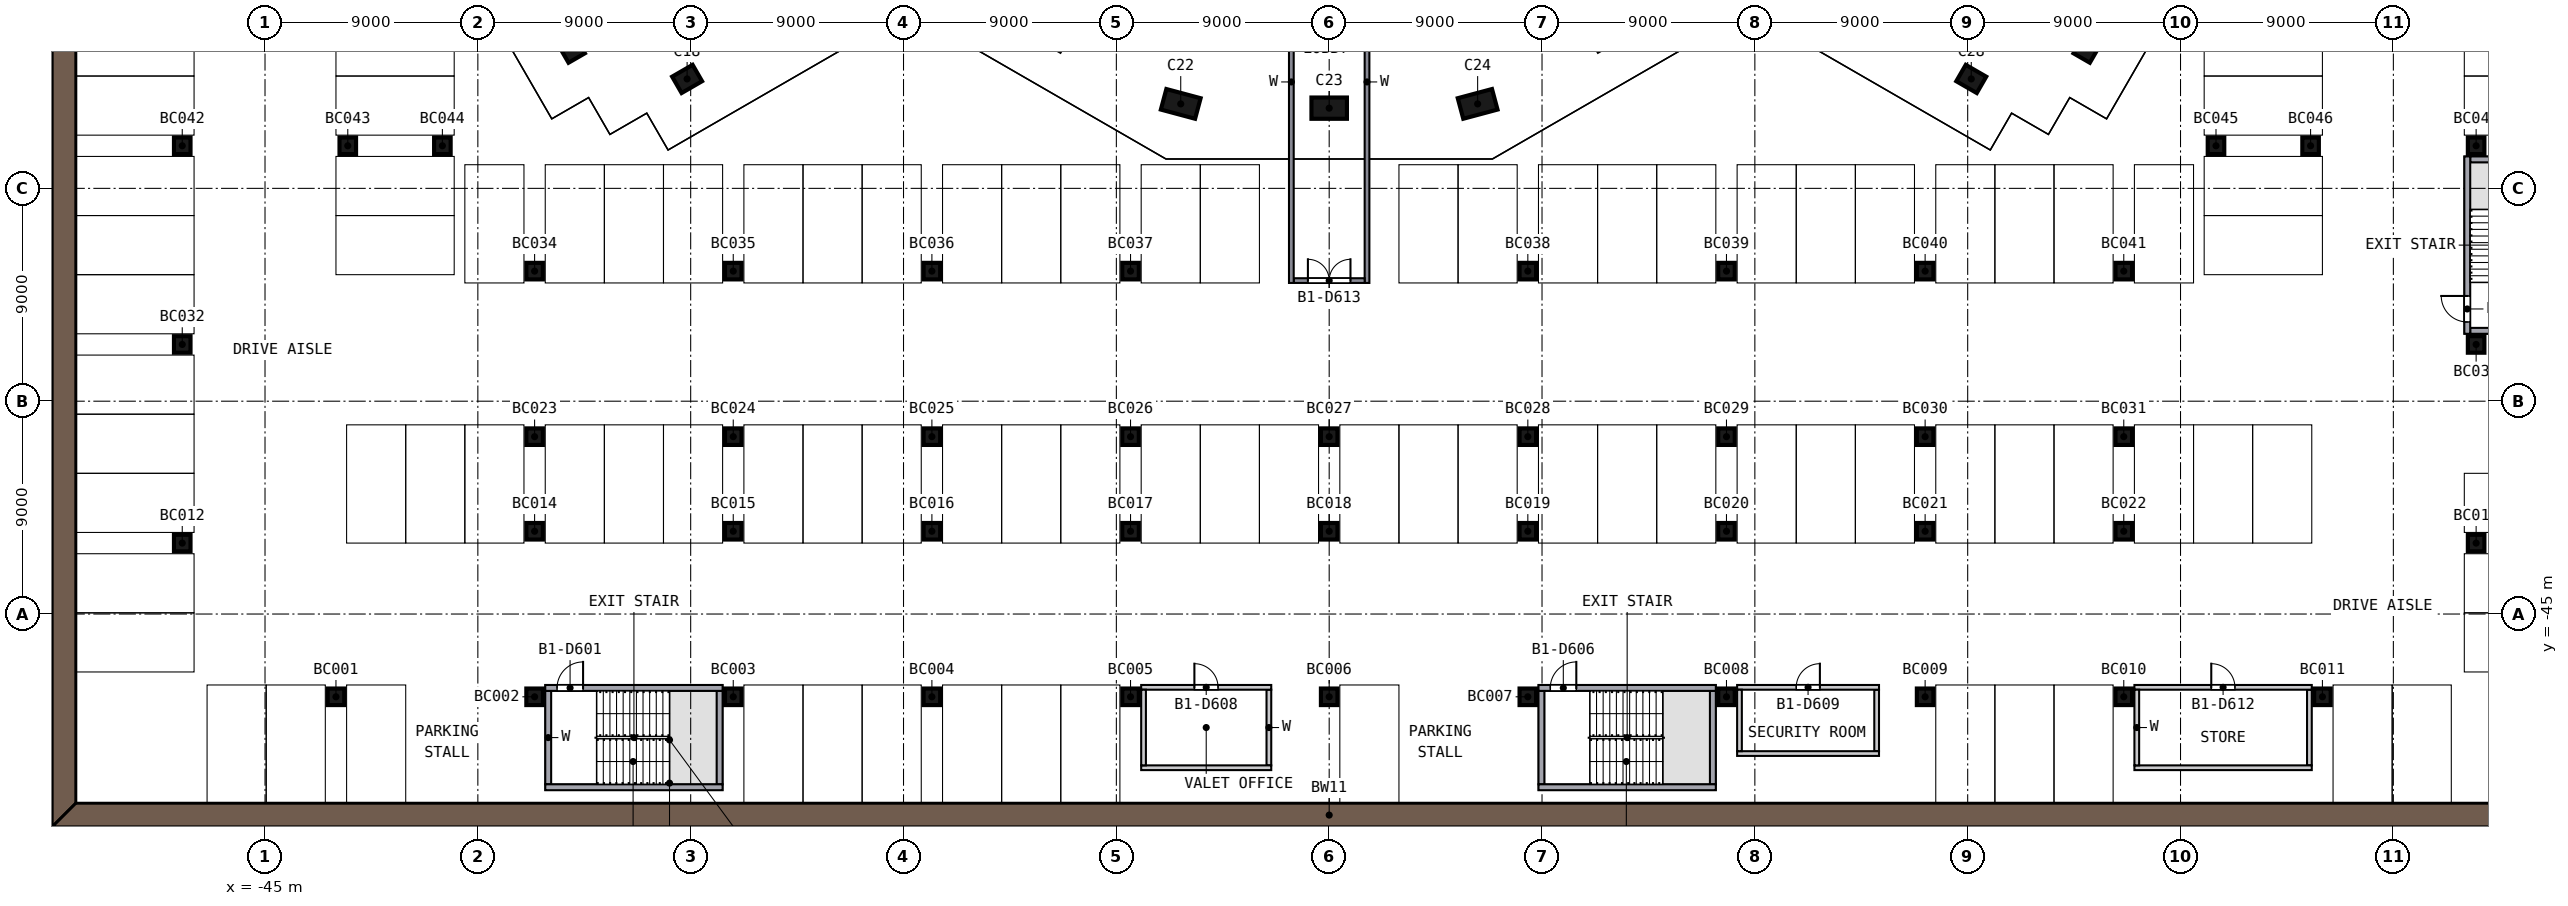
"""IFC4 building model, lengths in metres.
Left out: names, types, materials, properties, quantities, classifications, styles, units other than length and angle.
Written with IfcOpenShell. Run it as: python <this file> out.ifc"""

import sys

from ifc_helpers import new_model, si_unit, direction, frame, frame_2d, origin, origin_2d, place, context, subcontext, project, spatial, polyline, rectangle, outline, extrude, element, fill, save


model = new_model("IFC4")
c1 = context("Model", 3, precision=1e-05, world=origin(), true_north=direction((0.0, 1.0)))
c2 = subcontext(c1, "Body", "Model", "MODEL_VIEW")
j1 = project(units=[si_unit("LENGTHUNIT", "METRE"), si_unit("PLANEANGLEUNIT", "RADIAN")], contexts=[c1])
p1 = place(None, origin())
s1 = spatial("IfcSite", under=j1, at=p1, CompositionType="ELEMENT")
p2 = place(p1, origin())
s2 = spatial("IfcBuilding", under=s1, at=p2, CompositionType="ELEMENT")
p3 = place(p2, frame((0.0, 0.0, -3.9)))
s3 = spatial("IfcBuildingStorey", under=s2, at=p3, CompositionType="ELEMENT", Elevation=-3.9)
for number, where, z_axis, x_axis in (
    (1, (-32.069, -21.055, 0.0), (0.0, 0.0, 1.0), (0.5, -0.866, 0.0)),
    (2, (-27.151, -22.373, 0.0), (0.0, 0.0, 1.0), (0.866, 0.5, 0.0)),
):
    element("IfcColumn", number, at=place(p3, frame(where, z_axis=z_axis, x_axis=x_axis)), inside=s3, PredefinedType="COLUMN", context=c2, shape_type="SweptSolid", body=[
        extrude(rectangle(XDim=1.0, YDim=0.8, at=origin_2d()), origin(), (0.0, 0.0, 1.0), 3.45),
    ])
for number, where, z_axis, x_axis in (
    (3, (-6.278, -23.428, 0.0), (0.0, 0.0, 1.0), (-0.966, 0.259, 0.0)),
    (4, (0.0, -23.608, 0.0), (0.0, 0.0, 1.0), (1.0, 0.0, 0.0)),
    (5, (6.278, -23.428, 0.0), (0.0, 0.0, 1.0), (-0.966, -0.259, 0.0)),
):
    element("IfcColumn", number, at=place(p3, frame(where, z_axis=z_axis, x_axis=x_axis)), inside=s3, PredefinedType="COLUMN", context=c2, shape_type="SweptSolid", body=[
        extrude(rectangle(XDim=1.5, YDim=0.9, at=origin_2d()), origin(), (0.0, 0.0, 1.0), 3.45),
    ])
for number, where, z_axis, x_axis in (
    (6, (27.151, -22.373, 0.0), (0.0, 0.0, 1.0), (0.866, -0.5, 0.0)),
    (7, (32.069, -21.055, 0.0), (0.0, 0.0, 1.0), (0.5, 0.866, 0.0)),
):
    element("IfcColumn", number, at=place(p3, frame(where, z_axis=z_axis, x_axis=x_axis)), inside=s3, PredefinedType="COLUMN", context=c2, shape_type="SweptSolid", body=[
        extrude(rectangle(XDim=1.0, YDim=0.8, at=origin_2d()), origin(), (0.0, 0.0, 1.0), 3.45),
    ])
p4 = place(p3, origin())
e8 = element("IfcWall", 8, at=p4, inside=s3, PredefinedType="SOLIDWALL", context=c2, shape_type="SweptSolid", body=[
    extrude(outline(polyline([(-54.0, 54.0), (-54.0, -54.0), (-53.0, -53.0), (-53.0, 53.0), (-54.0, 54.0)])), origin(), (0.0, 0.0, 1.0), 3.9),
])
p5 = place(p3, origin())
e9 = element("IfcWall", 9, at=p5, inside=s3, PredefinedType="SOLIDWALL", context=c2, shape_type="SweptSolid", body=[
    extrude(outline(polyline([(-54.0, -54.0), (54.0, -54.0), (53.0, -53.0), (-53.0, -53.0), (-54.0, -54.0)])), origin(), (0.0, 0.0, 1.0), 3.9),
])
for number, where, z_axis, x_axis in (
    (10, (-42.0, -48.5, 0.0), (0.0, 0.0, 1.0), (1.0, 0.0, 0.0)),
    (11, (-33.6, -48.5, 0.0), (0.0, 0.0, 1.0), (1.0, 0.0, 0.0)),
    (12, (-25.2, -48.5, 0.0), (0.0, 0.0, 1.0), (1.0, 0.0, 0.0)),
    (13, (-16.8, -48.5, 0.0), (0.0, 0.0, 1.0), (1.0, 0.0, 0.0)),
    (14, (-8.4, -48.5, 0.0), (0.0, 0.0, 1.0), (1.0, 0.0, 0.0)),
    (15, (0.0, -48.5, 0.0), (0.0, 0.0, 1.0), (1.0, 0.0, 0.0)),
    (16, (8.4, -48.5, 0.0), (0.0, 0.0, 1.0), (1.0, 0.0, 0.0)),
    (17, (16.8, -48.5, 0.0), (0.0, 0.0, 1.0), (1.0, 0.0, 0.0)),
    (18, (25.2, -48.5, 0.0), (0.0, 0.0, 1.0), (1.0, 0.0, 0.0)),
    (19, (33.6, -48.5, 0.0), (0.0, 0.0, 1.0), (1.0, 0.0, 0.0)),
    (20, (42.0, -48.5, 0.0), (0.0, 0.0, 1.0), (1.0, 0.0, 0.0)),
    (21, (-48.5, -42.0, 0.0), (0.0, 0.0, 1.0), (1.0, 0.0, 0.0)),
    (22, (48.5, -42.0, 0.0), (0.0, 0.0, 1.0), (1.0, 0.0, 0.0)),
    (23, (-33.6, -41.5, 0.0), (0.0, 0.0, 1.0), (1.0, 0.0, 0.0)),
    (24, (-25.2, -41.5, 0.0), (0.0, 0.0, 1.0), (1.0, 0.0, 0.0)),
    (25, (-16.8, -41.5, 0.0), (0.0, 0.0, 1.0), (1.0, 0.0, 0.0)),
    (26, (-8.4, -41.5, 0.0), (0.0, 0.0, 1.0), (1.0, 0.0, 0.0)),
    (27, (0.0, -41.5, 0.0), (0.0, 0.0, 1.0), (1.0, 0.0, 0.0)),
    (28, (8.4, -41.5, 0.0), (0.0, 0.0, 1.0), (1.0, 0.0, 0.0)),
    (29, (16.8, -41.5, 0.0), (0.0, 0.0, 1.0), (1.0, 0.0, 0.0)),
    (30, (25.2, -41.5, 0.0), (0.0, 0.0, 1.0), (1.0, 0.0, 0.0)),
    (31, (33.6, -41.5, 0.0), (0.0, 0.0, 1.0), (1.0, 0.0, 0.0)),
    (32, (-33.6, -37.5, 0.0), (0.0, 0.0, 1.0), (1.0, 0.0, 0.0)),
    (33, (-25.2, -37.5, 0.0), (0.0, 0.0, 1.0), (1.0, 0.0, 0.0)),
    (34, (-16.8, -37.5, 0.0), (0.0, 0.0, 1.0), (1.0, 0.0, 0.0)),
    (35, (-8.4, -37.5, 0.0), (0.0, 0.0, 1.0), (1.0, 0.0, 0.0)),
    (36, (0.0, -37.5, 0.0), (0.0, 0.0, 1.0), (1.0, 0.0, 0.0)),
    (37, (8.4, -37.5, 0.0), (0.0, 0.0, 1.0), (1.0, 0.0, 0.0)),
    (38, (16.8, -37.5, 0.0), (0.0, 0.0, 1.0), (1.0, 0.0, 0.0)),
    (39, (25.2, -37.5, 0.0), (0.0, 0.0, 1.0), (1.0, 0.0, 0.0)),
    (40, (33.6, -37.5, 0.0), (0.0, 0.0, 1.0), (1.0, 0.0, 0.0)),
    (41, (-48.5, -33.6, 0.0), (0.0, 0.0, 1.0), (1.0, 0.0, 0.0)),
    (42, (48.5, -33.6, 0.0), (0.0, 0.0, 1.0), (1.0, 0.0, 0.0)),
    (43, (-33.6, -30.5, 0.0), (0.0, 0.0, 1.0), (1.0, 0.0, 0.0)),
    (44, (-25.2, -30.5, 0.0), (0.0, 0.0, 1.0), (1.0, 0.0, 0.0)),
    (45, (-16.8, -30.5, 0.0), (0.0, 0.0, 1.0), (1.0, 0.0, 0.0)),
    (46, (-8.4, -30.5, 0.0), (0.0, 0.0, 1.0), (1.0, 0.0, 0.0)),
    (47, (8.4, -30.5, 0.0), (0.0, 0.0, 1.0), (1.0, 0.0, 0.0)),
    (48, (16.8, -30.5, 0.0), (0.0, 0.0, 1.0), (1.0, 0.0, 0.0)),
    (49, (25.2, -30.5, 0.0), (0.0, 0.0, 1.0), (1.0, 0.0, 0.0)),
    (50, (33.6, -30.5, 0.0), (0.0, 0.0, 1.0), (1.0, 0.0, 0.0)),
    (51, (-48.5, -25.2, 0.0), (0.0, 0.0, 1.0), (1.0, 0.0, 0.0)),
    (52, (-41.5, -25.2, 0.0), (0.0, 0.0, 1.0), (1.0, 0.0, 0.0)),
    (53, (-37.5, -25.2, 0.0), (0.0, 0.0, 1.0), (1.0, 0.0, 0.0)),
    (54, (37.5, -25.2, 0.0), (0.0, 0.0, 1.0), (1.0, 0.0, 0.0)),
    (55, (41.5, -25.2, 0.0), (0.0, 0.0, 1.0), (1.0, 0.0, 0.0)),
    (56, (48.5, -25.2, 0.0), (0.0, 0.0, 1.0), (1.0, 0.0, 0.0)),
):
    element("IfcColumn", number, at=place(p3, frame(where, z_axis=z_axis, x_axis=x_axis)), inside=s3, PredefinedType="COLUMN", context=c2, shape_type="SweptSolid", body=[
        extrude(rectangle(XDim=0.7, YDim=0.7, at=origin_2d()), origin(), (0.0, 0.0, 1.0), 3.84),
    ])
p6 = place(p3, frame((-33.15, -48.125, 0.0), z_axis=(0.0, 0.0, 1.0), x_axis=(1.0, 0.0, 0.0)))
e57 = element("IfcWall", 57, at=p6, inside=s3, PredefinedType="SOLIDWALL", context=c2, shape_type="SweptSolid", body=[
    extrude(rectangle(XDim=7.5, YDim=0.25, at=frame_2d((3.75, 0.0))), origin(), (0.0, 0.0, 1.0), 3.9),
])
p7 = place(p6, frame((0.5, 0.0, 0.0)))
e58 = element("IfcOpeningElement", 58, at=p7, cuts=e57, PredefinedType="OPENING", context=c2, shape_type="SweptSolid", body=[
    extrude(rectangle(XDim=1.1, YDim=2.1, at=frame_2d((0.55, 1.05))), frame((0.0, 0.135, 0.0), z_axis=(0.0, -1.0, 0.0), x_axis=(1.0, 0.0, 0.0)), (0.0, 0.0, 1.0), 0.27),
])
p8 = place(p3, frame((-33.15, -52.325, 0.0), z_axis=(0.0, 0.0, 1.0), x_axis=(1.0, 0.0, 0.0)))
e59 = element("IfcWall", 59, at=p8, inside=s3, PredefinedType="SOLIDWALL", context=c2, shape_type="SweptSolid", body=[
    extrude(rectangle(XDim=7.5, YDim=0.25, at=frame_2d((3.75, 0.0))), origin(), (0.0, 0.0, 1.0), 3.9),
])
for number, where, z_axis, x_axis in (
    (60, (-33.025, -52.2, 0.0), (0.0, 0.0, 1.0), (0.0, 1.0, 0.0)),
    (61, (-25.775, -52.2, 0.0), (0.0, 0.0, 1.0), (0.0, 1.0, 0.0)),
):
    element("IfcWall", number, at=place(p3, frame(where, z_axis=z_axis, x_axis=x_axis)), inside=s3, PredefinedType="SOLIDWALL", context=c2, shape_type="SweptSolid", body=[
        extrude(rectangle(XDim=3.95, YDim=0.25, at=frame_2d((1.975, 0.0))), origin(), (0.0, 0.0, 1.0), 3.9),
    ])
p9 = place(p3, frame((48.125, -33.15, 0.0), z_axis=(0.0, 0.0, 1.0), x_axis=(0.0, 1.0, 0.0)))
e62 = element("IfcWall", 62, at=p9, inside=s3, PredefinedType="SOLIDWALL", context=c2, shape_type="SweptSolid", body=[
    extrude(rectangle(XDim=7.5, YDim=0.25, at=frame_2d((3.75, 0.0))), origin(), (0.0, 0.0, 1.0), 3.9),
])
p10 = place(p9, frame((0.5, 0.0, 0.0)))
e63 = element("IfcOpeningElement", 63, at=p10, cuts=e62, PredefinedType="OPENING", context=c2, shape_type="SweptSolid", body=[
    extrude(rectangle(XDim=1.1, YDim=2.1, at=frame_2d((0.55, 1.05))), frame((0.0, 0.135, 0.0), z_axis=(0.0, -1.0, 0.0), x_axis=(1.0, 0.0, 0.0)), (0.0, 0.0, 1.0), 0.27),
])
for number, where, z_axis, x_axis in (
    (64, (52.2, -33.025, 0.0), (0.0, 0.0, 1.0), (-1.0, 0.0, 0.0)),
    (65, (52.2, -25.775, 0.0), (0.0, 0.0, 1.0), (-1.0, 0.0, 0.0)),
):
    element("IfcWall", number, at=place(p3, frame(where, z_axis=z_axis, x_axis=x_axis)), inside=s3, PredefinedType="SOLIDWALL", context=c2, shape_type="SweptSolid", body=[
        extrude(rectangle(XDim=3.95, YDim=0.25, at=frame_2d((1.975, 0.0))), origin(), (0.0, 0.0, 1.0), 3.9),
    ])
p11 = place(p3, frame((8.85, -48.125, 0.0), z_axis=(0.0, 0.0, 1.0), x_axis=(1.0, 0.0, 0.0)))
e66 = element("IfcWall", 66, at=p11, inside=s3, PredefinedType="SOLIDWALL", context=c2, shape_type="SweptSolid", body=[
    extrude(rectangle(XDim=7.5, YDim=0.25, at=frame_2d((3.75, 0.0))), origin(), (0.0, 0.0, 1.0), 3.9),
])
p12 = place(p11, frame((0.5, 0.0, 0.0)))
e67 = element("IfcOpeningElement", 67, at=p12, cuts=e66, PredefinedType="OPENING", context=c2, shape_type="SweptSolid", body=[
    extrude(rectangle(XDim=1.1, YDim=2.1, at=frame_2d((0.55, 1.05))), frame((0.0, 0.135, 0.0), z_axis=(0.0, -1.0, 0.0), x_axis=(1.0, 0.0, 0.0)), (0.0, 0.0, 1.0), 0.27),
])
p13 = place(p3, frame((8.85, -52.325, 0.0), z_axis=(0.0, 0.0, 1.0), x_axis=(1.0, 0.0, 0.0)))
e68 = element("IfcWall", 68, at=p13, inside=s3, PredefinedType="SOLIDWALL", context=c2, shape_type="SweptSolid", body=[
    extrude(rectangle(XDim=7.5, YDim=0.25, at=frame_2d((3.75, 0.0))), origin(), (0.0, 0.0, 1.0), 3.9),
])
for number, where, z_axis, x_axis in (
    (69, (8.975, -52.2, 0.0), (0.0, 0.0, 1.0), (0.0, 1.0, 0.0)),
    (70, (16.225, -52.2, 0.0), (0.0, 0.0, 1.0), (0.0, 1.0, 0.0)),
):
    element("IfcWall", number, at=place(p3, frame(where, z_axis=z_axis, x_axis=x_axis)), inside=s3, PredefinedType="SOLIDWALL", context=c2, shape_type="SweptSolid", body=[
        extrude(rectangle(XDim=3.95, YDim=0.25, at=frame_2d((1.975, 0.0))), origin(), (0.0, 0.0, 1.0), 3.9),
    ])
p14 = place(p3, frame((-7.95, -48.1, 0.0), z_axis=(0.0, 0.0, 1.0), x_axis=(1.0, 0.0, 0.0)))
e71 = element("IfcWall", 71, at=p14, inside=s3, PredefinedType="PARTITIONING", context=c2, shape_type="SweptSolid", body=[
    extrude(rectangle(XDim=5.5, YDim=0.2, at=frame_2d((2.75, 0.0))), origin(), (0.0, 0.0, 1.0), 3.3),
])
p15 = place(p14, frame((2.25, 0.0, 0.0)))
e72 = element("IfcOpeningElement", 72, at=p15, cuts=e71, PredefinedType="OPENING", context=c2, shape_type="SweptSolid", body=[
    extrude(rectangle(XDim=1.0, YDim=2.1, at=frame_2d((0.5, 1.05))), frame((0.0, 0.11, 0.0), z_axis=(0.0, -1.0, 0.0), x_axis=(1.0, 0.0, 0.0)), (0.0, 0.0, 1.0), 0.22),
])
p16 = place(p3, frame((-7.95, -51.5, 0.0), z_axis=(0.0, 0.0, 1.0), x_axis=(1.0, 0.0, 0.0)))
e73 = element("IfcWall", 73, at=p16, inside=s3, PredefinedType="PARTITIONING", context=c2, shape_type="SweptSolid", body=[
    extrude(rectangle(XDim=5.5, YDim=0.2, at=frame_2d((2.75, 0.0))), origin(), (0.0, 0.0, 1.0), 3.3),
])
for number, where, z_axis, x_axis in (
    (74, (-7.85, -51.4, 0.0), (0.0, 0.0, 1.0), (0.0, 1.0, 0.0)),
    (75, (-2.55, -51.4, 0.0), (0.0, 0.0, 1.0), (0.0, 1.0, 0.0)),
):
    element("IfcWall", number, at=place(p3, frame(where, z_axis=z_axis, x_axis=x_axis)), inside=s3, PredefinedType="PARTITIONING", context=c2, shape_type="SweptSolid", body=[
        extrude(rectangle(XDim=3.2, YDim=0.2, at=frame_2d((1.6, 0.0))), origin(), (0.0, 0.0, 1.0), 3.3),
    ])
p17 = place(p3, frame((17.25, -48.1, 0.0), z_axis=(0.0, 0.0, 1.0), x_axis=(1.0, 0.0, 0.0)))
e76 = element("IfcWall", 76, at=p17, inside=s3, PredefinedType="PARTITIONING", context=c2, shape_type="SweptSolid", body=[
    extrude(rectangle(XDim=6.0, YDim=0.2, at=frame_2d((3.0, 0.0))), origin(), (0.0, 0.0, 1.0), 3.3),
])
p18 = place(p17, frame((2.5, 0.0, 0.0)))
e77 = element("IfcOpeningElement", 77, at=p18, cuts=e76, PredefinedType="OPENING", context=c2, shape_type="SweptSolid", body=[
    extrude(rectangle(XDim=1.0, YDim=2.1, at=frame_2d((0.5, 1.05))), frame((0.0, 0.11, 0.0), z_axis=(0.0, -1.0, 0.0), x_axis=(1.0, 0.0, 0.0)), (0.0, 0.0, 1.0), 0.22),
])
p19 = place(p3, frame((17.25, -50.9, 0.0), z_axis=(0.0, 0.0, 1.0), x_axis=(1.0, 0.0, 0.0)))
e78 = element("IfcWall", 78, at=p19, inside=s3, PredefinedType="PARTITIONING", context=c2, shape_type="SweptSolid", body=[
    extrude(rectangle(XDim=6.0, YDim=0.2, at=frame_2d((3.0, 0.0))), origin(), (0.0, 0.0, 1.0), 3.3),
])
for number, where, z_axis, x_axis in (
    (79, (17.35, -50.8, 0.0), (0.0, 0.0, 1.0), (0.0, 1.0, 0.0)),
    (80, (23.15, -50.8, 0.0), (0.0, 0.0, 1.0), (0.0, 1.0, 0.0)),
):
    element("IfcWall", number, at=place(p3, frame(where, z_axis=z_axis, x_axis=x_axis)), inside=s3, PredefinedType="PARTITIONING", context=c2, shape_type="SweptSolid", body=[
        extrude(rectangle(XDim=2.6, YDim=0.2, at=frame_2d((1.3, 0.0))), origin(), (0.0, 0.0, 1.0), 3.3),
    ])
p20 = place(p3, frame((34.05, -48.1, 0.0), z_axis=(0.0, 0.0, 1.0), x_axis=(1.0, 0.0, 0.0)))
e81 = element("IfcWall", 81, at=p20, inside=s3, PredefinedType="PARTITIONING", context=c2, shape_type="SweptSolid", body=[
    extrude(rectangle(XDim=7.5, YDim=0.2, at=frame_2d((3.75, 0.0))), origin(), (0.0, 0.0, 1.0), 3.3),
])
p21 = place(p20, frame((3.25, 0.0, 0.0)))
e82 = element("IfcOpeningElement", 82, at=p21, cuts=e81, PredefinedType="OPENING", context=c2, shape_type="SweptSolid", body=[
    extrude(rectangle(XDim=1.0, YDim=2.1, at=frame_2d((0.5, 1.05))), frame((0.0, 0.11, 0.0), z_axis=(0.0, -1.0, 0.0), x_axis=(1.0, 0.0, 0.0)), (0.0, 0.0, 1.0), 0.22),
])
p22 = place(p3, frame((34.05, -51.5, 0.0), z_axis=(0.0, 0.0, 1.0), x_axis=(1.0, 0.0, 0.0)))
e83 = element("IfcWall", 83, at=p22, inside=s3, PredefinedType="PARTITIONING", context=c2, shape_type="SweptSolid", body=[
    extrude(rectangle(XDim=7.5, YDim=0.2, at=frame_2d((3.75, 0.0))), origin(), (0.0, 0.0, 1.0), 3.3),
])
for number, where, z_axis, x_axis in (
    (84, (34.15, -51.4, 0.0), (0.0, 0.0, 1.0), (0.0, 1.0, 0.0)),
    (85, (41.45, -51.4, 0.0), (0.0, 0.0, 1.0), (0.0, 1.0, 0.0)),
):
    element("IfcWall", number, at=place(p3, frame(where, z_axis=z_axis, x_axis=x_axis)), inside=s3, PredefinedType="PARTITIONING", context=c2, shape_type="SweptSolid", body=[
        extrude(rectangle(XDim=3.2, YDim=0.2, at=frame_2d((1.6, 0.0))), origin(), (0.0, 0.0, 1.0), 3.3),
    ])
for number, where, z_axis, x_axis in (
    (86, (-1.6, -31.0, 0.0), (0.0, 0.0, 1.0), (0.0, 1.0, 0.0)),
    (87, (1.6, -31.0, 0.0), (0.0, 0.0, 1.0), (0.0, 1.0, 0.0)),
):
    element("IfcWall", number, at=place(p3, frame(where, z_axis=z_axis, x_axis=x_axis)), inside=s3, PredefinedType="PARTITIONING", context=c2, shape_type="SweptSolid", body=[
        extrude(rectangle(XDim=17.0, YDim=0.2, at=frame_2d((8.5, 0.0))), origin(), (0.0, 0.0, 1.0), 3.3),
    ])
p23 = place(p3, frame((-1.5, -30.9, 0.0), z_axis=(0.0, 0.0, 1.0), x_axis=(1.0, 0.0, 0.0)))
e88 = element("IfcWall", 88, at=p23, inside=s3, PredefinedType="PARTITIONING", context=c2, shape_type="SweptSolid", body=[
    extrude(rectangle(XDim=3.0, YDim=0.2, at=frame_2d((1.5, 0.0))), origin(), (0.0, 0.0, 1.0), 3.3),
])
p24 = place(p23, frame((0.6, 0.0, 0.0)))
e89 = element("IfcOpeningElement", 89, at=p24, cuts=e88, PredefinedType="OPENING", context=c2, shape_type="SweptSolid", body=[
    extrude(rectangle(XDim=1.8, YDim=2.1, at=frame_2d((0.9, 1.05))), frame((0.0, 0.11, 0.0), z_axis=(0.0, -1.0, 0.0), x_axis=(1.0, 0.0, 0.0)), (0.0, 0.0, 1.0), 0.22),
])
p25 = place(p7, origin())
e90 = element("IfcDoor", 90, at=p25, inside=s3, OperationType="SINGLE_SWING_RIGHT", PredefinedType="DOOR", context=c2, shape_type="SweptSolid", body=[
    extrude(rectangle(XDim=1.1, YDim=2.1, at=frame_2d((0.55, 1.05))), frame((0.0, 0.025, 0.0), z_axis=(0.0, -1.0, 0.0), x_axis=(1.0, 0.0, 0.0)), (0.0, 0.0, 1.0), 0.05),
])
fill(e58, e90)
p26 = place(p10, origin())
e91 = element("IfcDoor", 91, at=p26, inside=s3, OperationType="SINGLE_SWING_RIGHT", PredefinedType="DOOR", context=c2, shape_type="SweptSolid", body=[
    extrude(rectangle(XDim=1.1, YDim=2.1, at=frame_2d((0.55, 1.05))), frame((0.0, 0.025, 0.0), z_axis=(0.0, -1.0, 0.0), x_axis=(1.0, 0.0, 0.0)), (0.0, 0.0, 1.0), 0.05),
])
fill(e63, e91)
p27 = place(p12, origin())
e92 = element("IfcDoor", 92, at=p27, inside=s3, OperationType="SINGLE_SWING_RIGHT", PredefinedType="DOOR", context=c2, shape_type="SweptSolid", body=[
    extrude(rectangle(XDim=1.1, YDim=2.1, at=frame_2d((0.55, 1.05))), frame((0.0, 0.025, 0.0), z_axis=(0.0, -1.0, 0.0), x_axis=(1.0, 0.0, 0.0)), (0.0, 0.0, 1.0), 0.05),
])
fill(e67, e92)
p28 = place(p15, origin())
e93 = element("IfcDoor", 93, at=p28, inside=s3, OperationType="SINGLE_SWING_LEFT", PredefinedType="DOOR", context=c2, shape_type="SweptSolid", body=[
    extrude(rectangle(XDim=1.0, YDim=2.1, at=frame_2d((0.5, 1.05))), frame((0.0, 0.025, 0.0), z_axis=(0.0, -1.0, 0.0), x_axis=(1.0, 0.0, 0.0)), (0.0, 0.0, 1.0), 0.05),
])
fill(e72, e93)
p29 = place(p18, origin())
e94 = element("IfcDoor", 94, at=p29, inside=s3, OperationType="SINGLE_SWING_RIGHT", PredefinedType="DOOR", context=c2, shape_type="SweptSolid", body=[
    extrude(rectangle(XDim=1.0, YDim=2.1, at=frame_2d((0.5, 1.05))), frame((0.0, 0.025, 0.0), z_axis=(0.0, -1.0, 0.0), x_axis=(1.0, 0.0, 0.0)), (0.0, 0.0, 1.0), 0.05),
])
fill(e77, e94)
p30 = place(p21, origin())
e95 = element("IfcDoor", 95, at=p30, inside=s3, OperationType="SINGLE_SWING_LEFT", PredefinedType="DOOR", context=c2, shape_type="SweptSolid", body=[
    extrude(rectangle(XDim=1.0, YDim=2.1, at=frame_2d((0.5, 1.05))), frame((0.0, 0.025, 0.0), z_axis=(0.0, -1.0, 0.0), x_axis=(1.0, 0.0, 0.0)), (0.0, 0.0, 1.0), 0.05),
])
fill(e82, e95)
p31 = place(p24, origin())
e96 = element("IfcDoor", 96, at=p31, inside=s3, OperationType="DOUBLE_DOOR_SINGLE_SWING", PredefinedType="DOOR", context=c2, shape_type="SweptSolid", body=[
    extrude(rectangle(XDim=1.8, YDim=2.1, at=frame_2d((0.9, 1.05))), frame((0.0, 0.025, 0.0), z_axis=(0.0, -1.0, 0.0), x_axis=(1.0, 0.0, 0.0)), (0.0, 0.0, 1.0), 0.05),
])
fill(e89, e96)
save(model, sys.argv[1])
